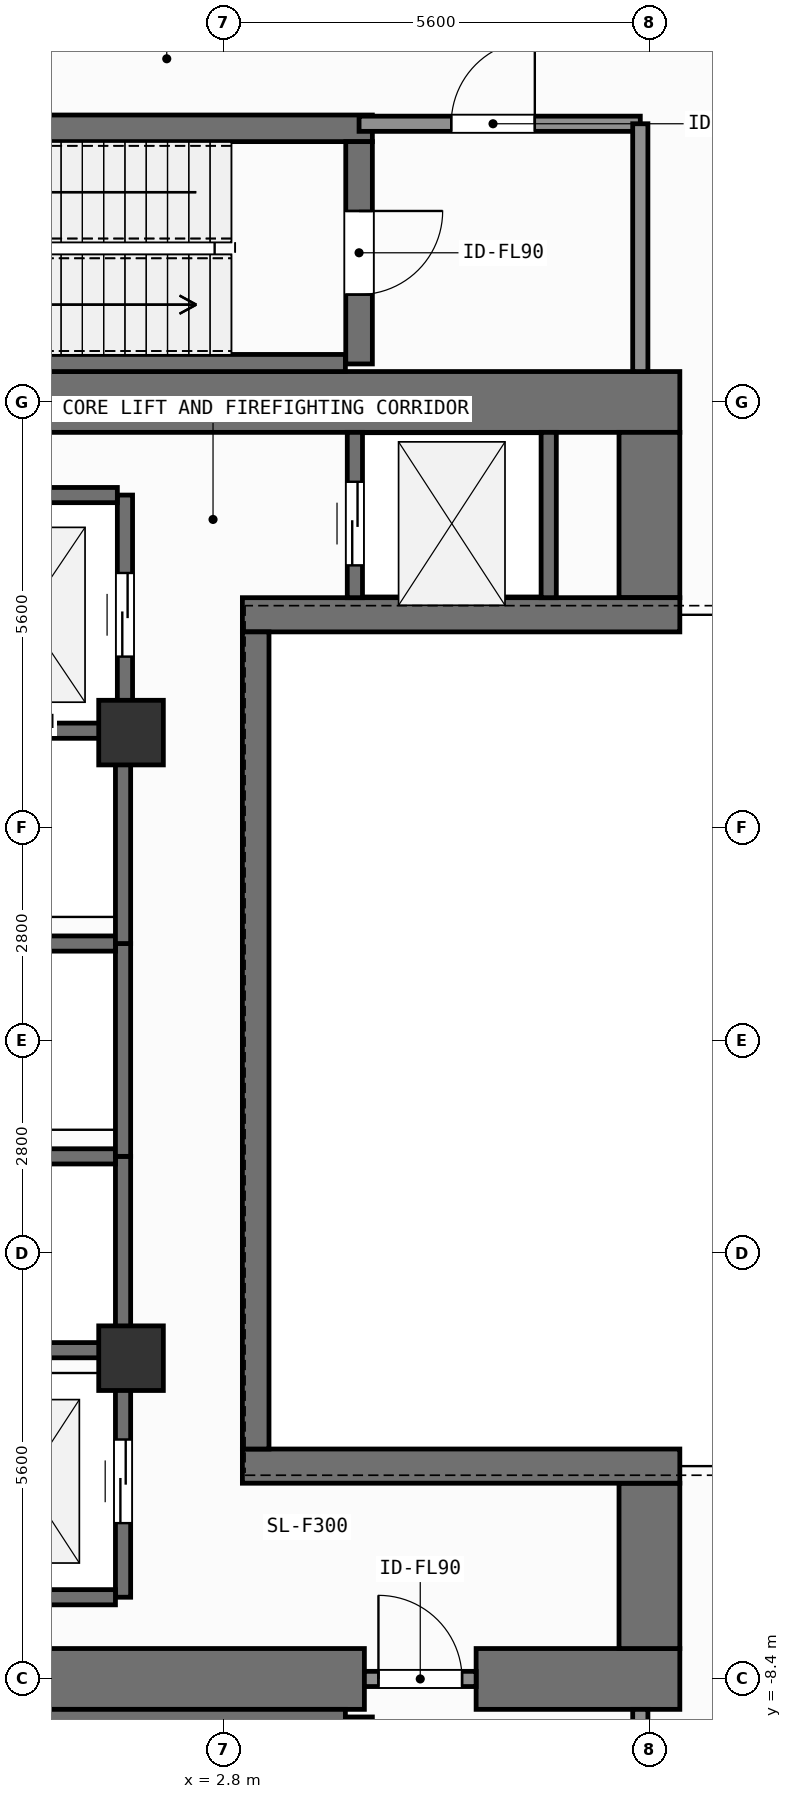
"""IFC4 building model, lengths in metres.
Left out: names, types, materials, properties, quantities, classifications, styles, units other than length and angle.
Written with IfcOpenShell. Run it as: python <this file> out.ifc"""

import sys

from ifc_helpers import new_model, si_unit, direction, frame, frame_2d, origin, origin_2d, place, context, subcontext, project, spatial, rectangle, extrude, element, fill, save


model = new_model("IFC4")
c1 = context("Model", 3, precision=1e-05, world=origin(), true_north=direction((0.0, 1.0)))
c2 = subcontext(c1, "Body", "Model", "MODEL_VIEW")
j1 = project(units=[si_unit("LENGTHUNIT", "METRE"), si_unit("PLANEANGLEUNIT", "RADIAN")], contexts=[c1])
p1 = place(None, origin())
s1 = spatial("IfcSite", under=j1, at=p1, CompositionType="ELEMENT")
p2 = place(p1, origin())
s2 = spatial("IfcBuilding", under=s1, at=p2, CompositionType="ELEMENT")
p3 = place(p2, frame((0.0, 0.0, 235.2)))
s3 = spatial("IfcBuildingStorey", under=s2, at=p3, CompositionType="ELEMENT", Elevation=235.2)
p4 = place(p3, frame((-2.62, -8.4, 0.0), z_axis=(0.0, 0.0, 1.0), x_axis=(1.0, 0.0, 0.0)))
e1 = element("IfcWall", 1, at=p4, inside=s3, PredefinedType="SHEAR", context=c2, shape_type="SweptSolid", body=[
    extrude(rectangle(XDim=7.27, YDim=0.8, at=frame_2d((3.635, 0.0))), origin(), (0.0, 0.0, 1.0), 7.8),
])
p5 = place(p3, frame((6.12, -8.4, 0.0), z_axis=(0.0, 0.0, 1.0), x_axis=(1.0, 0.0, 0.0)))
e2 = element("IfcWall", 2, at=p5, inside=s3, PredefinedType="SHEAR", context=c2, shape_type="SweptSolid", body=[
    extrude(rectangle(XDim=2.68, YDim=0.8, at=frame_2d((1.34, 0.0))), origin(), (0.0, 0.0, 1.0), 7.8),
])
p6 = place(p3, frame((-7.55, 8.4, 0.0), z_axis=(0.0, 0.0, 1.0), x_axis=(1.0, 0.0, 0.0)))
e3 = element("IfcWall", 3, at=p6, inside=s3, PredefinedType="SHEAR", context=c2, shape_type="SweptSolid", body=[
    extrude(rectangle(XDim=16.35, YDim=0.8, at=frame_2d((8.175, 0.0))), origin(), (0.0, 0.0, 1.0), 7.8),
])
for number, where, z_axis, x_axis in (
    (4, (8.4, -8.0, 0.0), (0.0, 0.0, 1.0), (0.0, 1.0, 0.0)),
    (5, (8.4, 5.825, 0.0), (0.0, 0.0, 1.0), (0.0, 1.0, 0.0)),
):
    element("IfcWall", number, at=place(p3, frame(where, z_axis=z_axis, x_axis=x_axis)), inside=s3, PredefinedType="SHEAR", context=c2, shape_type="SweptSolid", body=[
        extrude(rectangle(XDim=2.175, YDim=0.8, at=frame_2d((1.087, 0.0))), origin(), (0.0, 0.0, 1.0), 7.8),
    ])
for number, where, z_axis, x_axis in (
    (6, (3.045, -5.6, 0.0), (0.0, 0.0, 1.0), (1.0, 0.0, 0.0)),
    (7, (3.045, 5.6, 0.0), (0.0, 0.0, 1.0), (1.0, 0.0, 0.0)),
):
    element("IfcWall", number, at=place(p3, frame(where, z_axis=z_axis, x_axis=x_axis)), inside=s3, PredefinedType="SHEAR", context=c2, shape_type="SweptSolid", body=[
        extrude(rectangle(XDim=5.755, YDim=0.45, at=frame_2d((2.877, 0.0))), origin(), (0.0, 0.0, 1.0), 7.8),
    ])
p7 = place(p3, frame((3.22, -5.375, 0.0), z_axis=(0.0, 0.0, 1.0), x_axis=(0.0, 1.0, 0.0)))
e8 = element("IfcWall", 8, at=p7, inside=s3, PredefinedType="SHEAR", context=c2, shape_type="SweptSolid", body=[
    extrude(rectangle(XDim=10.75, YDim=0.35, at=frame_2d((5.375, 0.0))), origin(), (0.0, 0.0, 1.0), 7.8),
])
p8 = place(p3, frame((-2.2, -8.913, 0.0), z_axis=(0.0, 0.0, 1.0), x_axis=(1.0, 0.0, 0.0)))
e9 = element("IfcWall", 9, at=p8, inside=s3, PredefinedType="SHEAR", context=c2, shape_type="SweptSolid", body=[
    extrude(rectangle(XDim=6.6, YDim=0.225, at=frame_2d((3.3, 0.0))), origin(), (0.0, 0.0, 1.0), 7.8),
])
p9 = place(p3, frame((4.58, -8.9, 0.0), z_axis=(0.0, 0.0, 1.0), x_axis=(0.0, -1.0, 0.0)))
e10 = element("IfcWall", 10, at=p9, inside=s3, PredefinedType="SHEAR", context=c2, shape_type="SweptSolid", body=[
    extrude(rectangle(XDim=2.925, YDim=0.35, at=frame_2d((1.462, 0.0))), origin(), (0.0, 0.0, 1.0), 7.8),
])
p10 = place(p9, frame((0.913, 0.0, 0.0)))
e11 = element("IfcOpeningElement", 11, at=p10, cuts=e10, PredefinedType="OPENING", context=c2, shape_type="SweptSolid", body=[
    extrude(rectangle(XDim=1.1, YDim=2.15, at=frame_2d((0.55, 1.075))), frame((0.0, 0.185, 0.0), z_axis=(0.0, -1.0, 0.0), x_axis=(1.0, 0.0, 0.0)), (0.0, 0.0, 1.0), 0.37),
])
p11 = place(p3, frame((-2.555, 12.0, 0.0), z_axis=(0.0, 0.0, 1.0), x_axis=(1.0, 0.0, 0.0)))
e12 = element("IfcWall", 12, at=p11, inside=s3, PredefinedType="SHEAR", context=c2, shape_type="SweptSolid", body=[
    extrude(rectangle(XDim=7.31, YDim=0.35, at=frame_2d((3.655, 0.0))), origin(), (0.0, 0.0, 1.0), 7.8),
])
p12 = place(p3, frame((-2.2, 8.913, 0.0), z_axis=(0.0, 0.0, 1.0), x_axis=(1.0, 0.0, 0.0)))
e13 = element("IfcWall", 13, at=p12, inside=s3, PredefinedType="SHEAR", context=c2, shape_type="SweptSolid", body=[
    extrude(rectangle(XDim=6.6, YDim=0.225, at=frame_2d((3.3, 0.0))), origin(), (0.0, 0.0, 1.0), 7.8),
])
p13 = place(p3, frame((4.58, 11.825, 0.0), z_axis=(0.0, 0.0, 1.0), x_axis=(0.0, -1.0, 0.0)))
e14 = element("IfcWall", 14, at=p13, inside=s3, PredefinedType="SHEAR", context=c2, shape_type="SweptSolid", body=[
    extrude(rectangle(XDim=2.925, YDim=0.35, at=frame_2d((1.462, 0.0))), origin(), (0.0, 0.0, 1.0), 7.8),
])
p14 = place(p13, frame((0.913, 0.0, 0.0)))
e15 = element("IfcOpeningElement", 15, at=p14, cuts=e14, PredefinedType="OPENING", context=c2, shape_type="SweptSolid", body=[
    extrude(rectangle(XDim=1.1, YDim=2.15, at=frame_2d((0.55, 1.075))), frame((0.0, 0.185, 0.0), z_axis=(0.0, -1.0, 0.0), x_axis=(1.0, 0.0, 0.0)), (0.0, 0.0, 1.0), 0.37),
])
for number, where, z_axis, x_axis in (
    (16, (1.58, -4.18, 0.0), (0.0, 0.0, 1.0), (1.0, 0.0, 0.0)),
    (17, (1.58, 4.05, 0.0), (0.0, 0.0, 1.0), (1.0, 0.0, 0.0)),
):
    element("IfcColumn", number, at=place(p3, frame(where, z_axis=z_axis, x_axis=x_axis)), inside=s3, PredefinedType="COLUMN", context=c2, shape_type="SweptSolid", body=[
        extrude(rectangle(XDim=0.85, YDim=0.85, at=origin_2d()), origin(), (0.0, 0.0, 1.0), 7.8),
    ])
p15 = place(p3, frame((1.475, -4.275, 0.0), z_axis=(0.0, 0.0, 1.0), x_axis=(0.0, 1.0, 0.0)))
e18 = element("IfcWall", 18, at=p15, inside=s3, PredefinedType="SHEAR", context=c2, shape_type="SweptSolid", body=[
    extrude(rectangle(XDim=2.75, YDim=0.2, at=frame_2d((1.375, 0.0))), origin(), (0.0, 0.0, 1.0), 7.58),
])
for number, where, z_axis, x_axis in (
    (19, (-0.975, -4.075, 0.0), (0.0, 0.0, 1.0), (1.0, 0.0, 0.0)),
    (20, (-0.975, -1.525, 0.0), (0.0, 0.0, 1.0), (1.0, 0.0, 0.0)),
):
    element("IfcWall", number, at=place(p3, frame(where, z_axis=z_axis, x_axis=x_axis)), inside=s3, PredefinedType="SHEAR", context=c2, shape_type="SweptSolid", body=[
        extrude(rectangle(XDim=2.35, YDim=0.2, at=frame_2d((1.175, 0.0))), origin(), (0.0, 0.0, 1.0), 7.58),
    ])
p16 = place(p3, frame((1.475, -1.525, 0.0), z_axis=(0.0, 0.0, 1.0), x_axis=(0.0, 1.0, 0.0)))
e21 = element("IfcWall", 21, at=p16, inside=s3, PredefinedType="SHEAR", context=c2, shape_type="SweptSolid", body=[
    extrude(rectangle(XDim=2.8, YDim=0.2, at=frame_2d((1.4, 0.0))), origin(), (0.0, 0.0, 1.0), 7.58),
])
p17 = place(p3, frame((-0.975, 1.275, 0.0), z_axis=(0.0, 0.0, 1.0), x_axis=(1.0, 0.0, 0.0)))
e22 = element("IfcWall", 22, at=p17, inside=s3, PredefinedType="SHEAR", context=c2, shape_type="SweptSolid", body=[
    extrude(rectangle(XDim=2.35, YDim=0.2, at=frame_2d((1.175, 0.0))), origin(), (0.0, 0.0, 1.0), 7.58),
])
p18 = place(p3, frame((1.475, 1.275, 0.0), z_axis=(0.0, 0.0, 1.0), x_axis=(0.0, 1.0, 0.0)))
e23 = element("IfcWall", 23, at=p18, inside=s3, PredefinedType="SHEAR", context=c2, shape_type="SweptSolid", body=[
    extrude(rectangle(XDim=2.8, YDim=0.2, at=frame_2d((1.4, 0.0))), origin(), (0.0, 0.0, 1.0), 7.58),
])
p19 = place(p3, frame((-0.975, 4.075, 0.0), z_axis=(0.0, 0.0, 1.0), x_axis=(1.0, 0.0, 0.0)))
e24 = element("IfcWall", 24, at=p19, inside=s3, PredefinedType="SHEAR", context=c2, shape_type="SweptSolid", body=[
    extrude(rectangle(XDim=2.35, YDim=0.2, at=frame_2d((1.175, 0.0))), origin(), (0.0, 0.0, 1.0), 7.58),
])
p20 = place(p3, frame((1.5, 4.025, 0.0), z_axis=(0.0, 0.0, 1.0), x_axis=(0.0, 1.0, 0.0)))
e25 = element("IfcWall", 25, at=p20, inside=s3, PredefinedType="SHEAR", context=c2, shape_type="SweptSolid", body=[
    extrude(rectangle(XDim=3.15, YDim=0.2, at=frame_2d((1.575, 0.0))), origin(), (0.0, 0.0, 1.0), 7.58),
])
p21 = place(p20, frame((1.025, 0.0, 0.0)))
e26 = element("IfcOpeningElement", 26, at=p21, cuts=e25, PredefinedType="OPENING", context=c2, shape_type="SweptSolid", body=[
    extrude(rectangle(XDim=1.1, YDim=2.2, at=frame_2d((0.55, 1.1))), frame((0.0, 0.11, 0.0), z_axis=(0.0, -1.0, 0.0), x_axis=(1.0, 0.0, 0.0)), (0.0, 0.0, 1.0), 0.22),
])
p22 = place(p3, frame((-1.0, 7.175, 0.0), z_axis=(0.0, 0.0, 1.0), x_axis=(1.0, 0.0, 0.0)))
e27 = element("IfcWall", 27, at=p22, inside=s3, PredefinedType="SHEAR", context=c2, shape_type="SweptSolid", body=[
    extrude(rectangle(XDim=2.4, YDim=0.2, at=frame_2d((1.2, 0.0))), origin(), (0.0, 0.0, 1.0), 7.58),
])
p23 = place(p3, frame((1.475, -7.325, 0.0), z_axis=(0.0, 0.0, 1.0), x_axis=(0.0, 1.0, 0.0)))
e28 = element("IfcWall", 28, at=p23, inside=s3, PredefinedType="SHEAR", context=c2, shape_type="SweptSolid", body=[
    extrude(rectangle(XDim=3.05, YDim=0.2, at=frame_2d((1.525, 0.0))), origin(), (0.0, 0.0, 1.0), 7.58),
])
p24 = place(p23, frame((0.975, 0.0, 0.0)))
e29 = element("IfcOpeningElement", 29, at=p24, cuts=e28, PredefinedType="OPENING", context=c2, shape_type="SweptSolid", body=[
    extrude(rectangle(XDim=1.1, YDim=2.2, at=frame_2d((0.55, 1.1))), frame((0.0, 0.11, 0.0), z_axis=(0.0, -1.0, 0.0), x_axis=(1.0, 0.0, 0.0)), (0.0, 0.0, 1.0), 0.22),
])
p25 = place(p3, frame((-0.975, -7.325, 0.0), z_axis=(0.0, 0.0, 1.0), x_axis=(1.0, 0.0, 0.0)))
e30 = element("IfcWall", 30, at=p25, inside=s3, PredefinedType="SHEAR", context=c2, shape_type="SweptSolid", body=[
    extrude(rectangle(XDim=2.35, YDim=0.2, at=frame_2d((1.175, 0.0))), origin(), (0.0, 0.0, 1.0), 7.58),
])
p26 = place(p3, frame((4.525, 5.825, 0.0), z_axis=(0.0, 0.0, 1.0), x_axis=(0.0, 1.0, 0.0)))
e31 = element("IfcWall", 31, at=p26, inside=s3, PredefinedType="SHEAR", context=c2, shape_type="SweptSolid", body=[
    extrude(rectangle(XDim=2.175, YDim=0.2, at=frame_2d((1.087, 0.0))), origin(), (0.0, 0.0, 1.0), 7.58),
])
p27 = place(p26, frame((0.425, 0.0, 0.0)))
e32 = element("IfcOpeningElement", 32, at=p27, cuts=e31, PredefinedType="OPENING", context=c2, shape_type="SweptSolid", body=[
    extrude(rectangle(XDim=1.1, YDim=2.2, at=frame_2d((0.55, 1.1))), frame((0.0, 0.11, 0.0), z_axis=(0.0, -1.0, 0.0), x_axis=(1.0, 0.0, 0.0)), (0.0, 0.0, 1.0), 0.22),
])
p28 = place(p3, frame((7.075, 5.825, 0.0), z_axis=(0.0, 0.0, 1.0), x_axis=(0.0, 1.0, 0.0)))
e33 = element("IfcWall", 33, at=p28, inside=s3, PredefinedType="SHEAR", context=c2, shape_type="SweptSolid", body=[
    extrude(rectangle(XDim=2.175, YDim=0.2, at=frame_2d((1.087, 0.0))), origin(), (0.0, 0.0, 1.0), 7.58),
])
p29 = place(p3, frame((4.65, -8.4, 0.0), z_axis=(0.0, 0.0, 1.0), x_axis=(1.0, 0.0, 0.0)))
e34 = element("IfcWall", 34, at=p29, inside=s3, PredefinedType="SOLIDWALL", context=c2, shape_type="SweptSolid", body=[
    extrude(rectangle(XDim=1.47, YDim=0.2, at=frame_2d((0.735, 0.0))), origin(), (0.0, 0.0, 1.0), 6.72),
])
p30 = place(p29, frame((0.185, 0.0, 0.0)))
e35 = element("IfcOpeningElement", 35, at=p30, cuts=e34, PredefinedType="OPENING", context=c2, shape_type="SweptSolid", body=[
    extrude(rectangle(XDim=1.1, YDim=2.15, at=frame_2d((0.55, 1.075))), frame((0.0, 0.11, 0.0), z_axis=(0.0, -1.0, 0.0), x_axis=(1.0, 0.0, 0.0)), (0.0, 0.0, 1.0), 0.22),
])
p31 = place(p3, frame((4.58, 12.06, 0.0), z_axis=(0.0, 0.0, 1.0), x_axis=(1.0, 0.0, 0.0)))
e36 = element("IfcWall", 36, at=p31, inside=s3, PredefinedType="SOLIDWALL", context=c2, shape_type="SweptSolid", body=[
    extrude(rectangle(XDim=3.7, YDim=0.2, at=frame_2d((1.85, 0.0))), origin(), (0.0, 0.0, 1.0), 7.58),
])
p32 = place(p31, frame((1.212, 0.0, 0.0)))
e37 = element("IfcOpeningElement", 37, at=p32, cuts=e36, PredefinedType="OPENING", context=c2, shape_type="SweptSolid", body=[
    extrude(rectangle(XDim=1.1, YDim=2.15, at=frame_2d((0.55, 1.075))), frame((0.0, 0.11, 0.0), z_axis=(0.0, -1.0, 0.0), x_axis=(1.0, 0.0, 0.0)), (0.0, 0.0, 1.0), 0.22),
])
for number, where, z_axis, x_axis in (
    (38, (8.28, -12.06, 0.0), (0.0, 0.0, 1.0), (0.0, 1.0, 0.0)),
    (39, (8.28, 8.8, 0.0), (0.0, 0.0, 1.0), (0.0, 1.0, 0.0)),
):
    element("IfcWall", number, at=place(p3, frame(where, z_axis=z_axis, x_axis=x_axis)), inside=s3, PredefinedType="SOLIDWALL", context=c2, shape_type="SweptSolid", body=[
        extrude(rectangle(XDim=3.26, YDim=0.2, at=frame_2d((1.63, 0.0))), origin(), (0.0, 0.0, 1.0), 7.58),
    ])
p33 = place(p21, origin())
e40 = element("IfcDoor", 40, at=p33, inside=s3, OperationType="SLIDING_TO_LEFT", PredefinedType="DOOR", context=c2, shape_type="SweptSolid", body=[
    extrude(rectangle(XDim=1.1, YDim=2.2, at=frame_2d((0.55, 1.1))), frame((0.0, 0.025, 0.0), z_axis=(0.0, -1.0, 0.0), x_axis=(1.0, 0.0, 0.0)), (0.0, 0.0, 1.0), 0.05),
])
fill(e26, e40)
p34 = place(p24, origin())
e41 = element("IfcDoor", 41, at=p34, inside=s3, OperationType="SLIDING_TO_LEFT", PredefinedType="DOOR", context=c2, shape_type="SweptSolid", body=[
    extrude(rectangle(XDim=1.1, YDim=2.2, at=frame_2d((0.55, 1.1))), frame((0.0, 0.025, 0.0), z_axis=(0.0, -1.0, 0.0), x_axis=(1.0, 0.0, 0.0)), (0.0, 0.0, 1.0), 0.05),
])
fill(e29, e41)
p35 = place(p27, origin())
e42 = element("IfcDoor", 42, at=p35, inside=s3, OperationType="SLIDING_TO_LEFT", PredefinedType="DOOR", context=c2, shape_type="SweptSolid", body=[
    extrude(rectangle(XDim=1.1, YDim=2.2, at=frame_2d((0.55, 1.1))), frame((0.0, 0.025, 0.0), z_axis=(0.0, -1.0, 0.0), x_axis=(1.0, 0.0, 0.0)), (0.0, 0.0, 1.0), 0.05),
])
fill(e32, e42)
p36 = place(p14, origin())
e43 = element("IfcDoor", 43, at=p36, inside=s3, OperationType="SINGLE_SWING_LEFT", PredefinedType="DOOR", context=c2, shape_type="SweptSolid", body=[
    extrude(rectangle(XDim=1.1, YDim=2.15, at=frame_2d((0.55, 1.075))), frame((0.0, 0.025, 0.0), z_axis=(0.0, -1.0, 0.0), x_axis=(1.0, 0.0, 0.0)), (0.0, 0.0, 1.0), 0.05),
])
fill(e15, e43)
p37 = place(p30, origin())
e44 = element("IfcDoor", 44, at=p37, inside=s3, OperationType="SINGLE_SWING_LEFT", PredefinedType="DOOR", context=c2, shape_type="SweptSolid", body=[
    extrude(rectangle(XDim=1.1, YDim=2.15, at=frame_2d((0.55, 1.075))), frame((0.0, 0.025, 0.0), z_axis=(0.0, -1.0, 0.0), x_axis=(1.0, 0.0, 0.0)), (0.0, 0.0, 1.0), 0.05),
])
fill(e35, e44)
p38 = place(p32, origin())
e45 = element("IfcDoor", 45, at=p38, inside=s3, OperationType="SINGLE_SWING_RIGHT", PredefinedType="DOOR", context=c2, shape_type="SweptSolid", body=[
    extrude(rectangle(XDim=1.1, YDim=2.15, at=frame_2d((0.55, 1.075))), frame((0.0, 0.025, 0.0), z_axis=(0.0, -1.0, 0.0), x_axis=(1.0, 0.0, 0.0)), (0.0, 0.0, 1.0), 0.05),
])
fill(e37, e45)
save(model, sys.argv[1])
